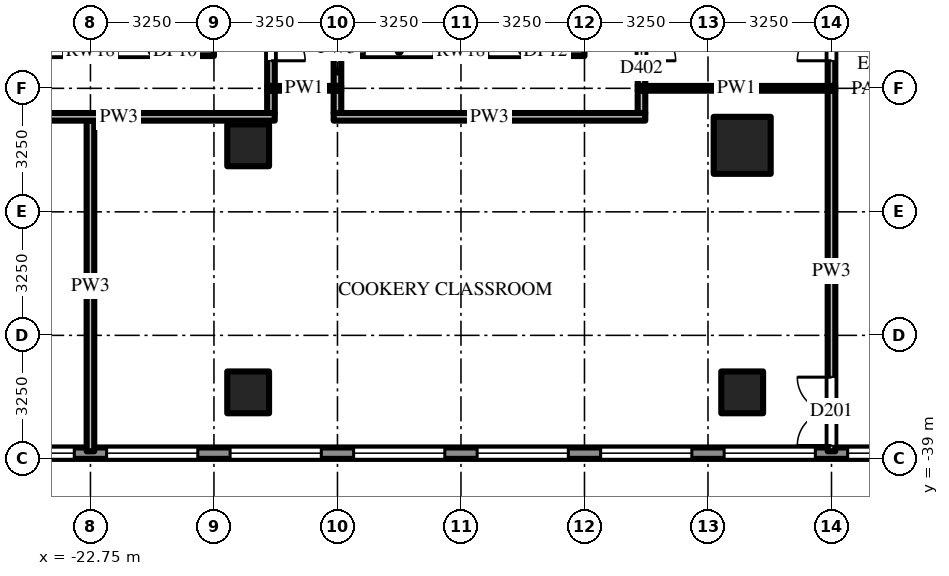
"""IFC4 building model, lengths in metres.
Left out: names, types, materials, properties, quantities, classifications, styles, units other than length and angle.
Written with IfcOpenShell. Run it as: python <this file> out.ifc"""

import sys

from ifc_helpers import new_model, si_unit, direction, frame, frame_2d, origin, origin_2d, place, context, subcontext, project, spatial, rectangle, extrude, source, transform, mapped, element, fill, save


model = new_model("IFC4")
c1 = context("Model", 3, precision=1e-05, world=origin(), true_north=direction((0.0, 1.0)))
c2 = subcontext(c1, "Body", "Model", "MODEL_VIEW")
j1 = project(units=[si_unit("LENGTHUNIT", "METRE"), si_unit("PLANEANGLEUNIT", "RADIAN")], contexts=[c1])
p1 = place(None, origin())
s1 = spatial("IfcSite", under=j1, at=p1, CompositionType="ELEMENT")
p2 = place(p1, origin())
s2 = spatial("IfcBuilding", under=s1, at=p2, CompositionType="ELEMENT")
p3 = place(p2, frame((0.0, 0.0, 19.0)))
s3 = spatial("IfcBuildingStorey", under=s2, at=p3, CompositionType="ELEMENT", Elevation=19.0)
m1 = source(origin(), c2, "Body", "SweptSolid", [
    extrude(rectangle(XDim=1.5, YDim=1.5, at=origin_2d()), origin(), (0.0, 0.0, 1.0), 5.0),
])
p4 = place(p3, frame((-5.6, -30.75, 0.0), z_axis=(0.0, 0.0, 1.0), x_axis=(1.0, 0.0, 0.0)))
e1 = element("IfcColumn", 1, at=p4, inside=s3, PredefinedType="COLUMN", context=c2, shape_type="MappedRepresentation", body=[
    mapped(m1, transform((0.0, 0.0, 0.0))),
])
m2 = source(origin(), c2, "Body", "SweptSolid", [
    extrude(rectangle(XDim=1.1, YDim=1.1, at=origin_2d()), origin(), (0.0, 0.0, 1.0), 5.0),
])
for number, where, z_axis, x_axis in (
    (2, (-5.6, -37.25, 0.0), (0.0, 0.0, 1.0), (1.0, 0.0, 0.0)),
    (3, (-18.6, -30.75, 0.0), (0.0, 0.0, 1.0), (1.0, 0.0, 0.0)),
    (4, (-18.6, -37.25, 0.0), (0.0, 0.0, 1.0), (1.0, 0.0, 0.0)),
):
    element("IfcColumn", number, at=place(p3, frame(where, z_axis=z_axis, x_axis=x_axis)), inside=s3, PredefinedType="COLUMN", context=c2, shape_type="MappedRepresentation", body=[
        mapped(m2, transform((0.0, 0.0, 0.0))),
    ])
m3 = source(origin(), c2, "Body", "SweptSolid", [
    extrude(rectangle(XDim=6.5, YDim=0.25, at=frame_2d((3.25, 0.0))), origin(), (0.0, 0.0, 1.0), 4.7),
])
p5 = place(p3, frame((-26.0, -28.275, 0.0), z_axis=(0.0, 0.0, 1.0), x_axis=(1.0, 0.0, 0.0)))
e5 = element("IfcWall", 5, at=p5, inside=s3, PredefinedType="SHEAR", context=c2, shape_type="MappedRepresentation", body=[
    mapped(m3, transform((0.0, 0.0, 0.0))),
])
m4 = source(origin(), c2, "Body", "SweptSolid", [
    extrude(rectangle(XDim=1.8, YDim=2.1, at=frame_2d((0.9, 1.05))), frame((0.0, 0.135, 0.0), z_axis=(0.0, -1.0, 0.0), x_axis=(1.0, 0.0, 0.0)), (0.0, 0.0, 1.0), 0.27),
])
p6 = place(p5, frame((0.725, 0.0, 0.0)))
e6 = element("IfcOpeningElement", 6, at=p6, cuts=e5, PredefinedType="OPENING", context=c2, shape_type="MappedRepresentation", body=[
    mapped(m4, transform((0.0, 0.0, 0.0))),
])
p7 = place(p5, frame((3.975, 0.0, 0.0)))
e7 = element("IfcOpeningElement", 7, at=p7, cuts=e5, PredefinedType="OPENING", context=c2, shape_type="MappedRepresentation", body=[
    mapped(m4, transform((0.0, 0.0, 0.0))),
])
p8 = place(p3, frame((-16.25, -28.275, 0.0), z_axis=(0.0, 0.0, 1.0), x_axis=(1.0, 0.0, 0.0)))
e8 = element("IfcWall", 8, at=p8, inside=s3, PredefinedType="SHEAR", context=c2, shape_type="MappedRepresentation", body=[
    mapped(m3, transform((0.0, 0.0, 0.0))),
])
p9 = place(p8, frame((0.725, 0.0, 0.0)))
e9 = element("IfcOpeningElement", 9, at=p9, cuts=e8, PredefinedType="OPENING", context=c2, shape_type="MappedRepresentation", body=[
    mapped(m4, transform((0.0, 0.0, 0.0))),
])
p10 = place(p8, frame((3.975, 0.0, 0.0)))
e10 = element("IfcOpeningElement", 10, at=p10, cuts=e8, PredefinedType="OPENING", context=c2, shape_type="MappedRepresentation", body=[
    mapped(m4, transform((0.0, 0.0, 0.0))),
])
m5 = source(origin(), c2, "Body", "SweptSolid", [
    extrude(rectangle(XDim=71.5, YDim=0.3, at=frame_2d((35.75, 0.0))), origin(), (0.0, 0.0, 1.0), 4.7),
])
p11 = place(p3, frame((-35.75, -38.85, 0.0), z_axis=(0.0, 0.0, 1.0), x_axis=(1.0, 0.0, 0.0)))
e11 = element("IfcWall", 11, at=p11, inside=s3, PredefinedType="SOLIDWALL", context=c2, shape_type="MappedRepresentation", body=[
    mapped(m5, transform((0.0, 0.0, 0.0))),
])
m6 = source(origin(), c2, "Body", "SweptSolid", [
    extrude(rectangle(XDim=2.4, YDim=3.0, at=frame_2d((1.2, 1.5))), frame((0.0, 0.16, 0.0), z_axis=(0.0, -1.0, 0.0), x_axis=(1.0, 0.0, 0.0)), (0.0, 0.0, 1.0), 0.32),
])
p12 = place(p11, frame((0.425, 0.0, 0.9)))
e12 = element("IfcOpeningElement", 12, at=p12, cuts=e11, PredefinedType="OPENING", context=c2, shape_type="MappedRepresentation", body=[
    mapped(m6, transform((0.0, 0.0, 0.0))),
])
p13 = place(p11, frame((3.675, 0.0, 0.9)))
e13 = element("IfcOpeningElement", 13, at=p13, cuts=e11, PredefinedType="OPENING", context=c2, shape_type="MappedRepresentation", body=[
    mapped(m6, transform((0.0, 0.0, 0.0))),
])
p14 = place(p11, frame((6.925, 0.0, 0.9)))
e14 = element("IfcOpeningElement", 14, at=p14, cuts=e11, PredefinedType="OPENING", context=c2, shape_type="MappedRepresentation", body=[
    mapped(m6, transform((0.0, 0.0, 0.0))),
])
p15 = place(p11, frame((10.175, 0.0, 0.9)))
e15 = element("IfcOpeningElement", 15, at=p15, cuts=e11, PredefinedType="OPENING", context=c2, shape_type="MappedRepresentation", body=[
    mapped(m6, transform((0.0, 0.0, 0.0))),
])
p16 = place(p11, frame((13.425, 0.0, 0.9)))
e16 = element("IfcOpeningElement", 16, at=p16, cuts=e11, PredefinedType="OPENING", context=c2, shape_type="MappedRepresentation", body=[
    mapped(m6, transform((0.0, 0.0, 0.0))),
])
p17 = place(p11, frame((16.675, 0.0, 0.9)))
e17 = element("IfcOpeningElement", 17, at=p17, cuts=e11, PredefinedType="OPENING", context=c2, shape_type="MappedRepresentation", body=[
    mapped(m6, transform((0.0, 0.0, 0.0))),
])
p18 = place(p11, frame((19.925, 0.0, 0.9)))
e18 = element("IfcOpeningElement", 18, at=p18, cuts=e11, PredefinedType="OPENING", context=c2, shape_type="MappedRepresentation", body=[
    mapped(m6, transform((0.0, 0.0, 0.0))),
])
p19 = place(p11, frame((23.175, 0.0, 0.9)))
e19 = element("IfcOpeningElement", 19, at=p19, cuts=e11, PredefinedType="OPENING", context=c2, shape_type="MappedRepresentation", body=[
    mapped(m6, transform((0.0, 0.0, 0.0))),
])
p20 = place(p11, frame((26.425, 0.0, 0.9)))
e20 = element("IfcOpeningElement", 20, at=p20, cuts=e11, PredefinedType="OPENING", context=c2, shape_type="MappedRepresentation", body=[
    mapped(m6, transform((0.0, 0.0, 0.0))),
])
p21 = place(p11, frame((29.675, 0.0, 0.9)))
e21 = element("IfcOpeningElement", 21, at=p21, cuts=e11, PredefinedType="OPENING", context=c2, shape_type="MappedRepresentation", body=[
    mapped(m6, transform((0.0, 0.0, 0.0))),
])
p22 = place(p11, frame((32.925, 0.0, 0.9)))
e22 = element("IfcOpeningElement", 22, at=p22, cuts=e11, PredefinedType="OPENING", context=c2, shape_type="MappedRepresentation", body=[
    mapped(m6, transform((0.0, 0.0, 0.0))),
])
p23 = place(p11, frame((36.175, 0.0, 0.9)))
e23 = element("IfcOpeningElement", 23, at=p23, cuts=e11, PredefinedType="OPENING", context=c2, shape_type="MappedRepresentation", body=[
    mapped(m6, transform((0.0, 0.0, 0.0))),
])
p24 = place(p11, frame((39.425, 0.0, 0.9)))
e24 = element("IfcOpeningElement", 24, at=p24, cuts=e11, PredefinedType="OPENING", context=c2, shape_type="MappedRepresentation", body=[
    mapped(m6, transform((0.0, 0.0, 0.0))),
])
p25 = place(p11, frame((42.675, 0.0, 0.9)))
e25 = element("IfcOpeningElement", 25, at=p25, cuts=e11, PredefinedType="OPENING", context=c2, shape_type="MappedRepresentation", body=[
    mapped(m6, transform((0.0, 0.0, 0.0))),
])
p26 = place(p11, frame((45.925, 0.0, 0.9)))
e26 = element("IfcOpeningElement", 26, at=p26, cuts=e11, PredefinedType="OPENING", context=c2, shape_type="MappedRepresentation", body=[
    mapped(m6, transform((0.0, 0.0, 0.0))),
])
p27 = place(p11, frame((49.175, 0.0, 0.9)))
e27 = element("IfcOpeningElement", 27, at=p27, cuts=e11, PredefinedType="OPENING", context=c2, shape_type="MappedRepresentation", body=[
    mapped(m6, transform((0.0, 0.0, 0.0))),
])
p28 = place(p11, frame((52.425, 0.0, 0.9)))
e28 = element("IfcOpeningElement", 28, at=p28, cuts=e11, PredefinedType="OPENING", context=c2, shape_type="MappedRepresentation", body=[
    mapped(m6, transform((0.0, 0.0, 0.0))),
])
p29 = place(p11, frame((55.675, 0.0, 0.9)))
e29 = element("IfcOpeningElement", 29, at=p29, cuts=e11, PredefinedType="OPENING", context=c2, shape_type="MappedRepresentation", body=[
    mapped(m6, transform((0.0, 0.0, 0.0))),
])
p30 = place(p11, frame((58.925, 0.0, 0.9)))
e30 = element("IfcOpeningElement", 30, at=p30, cuts=e11, PredefinedType="OPENING", context=c2, shape_type="MappedRepresentation", body=[
    mapped(m6, transform((0.0, 0.0, 0.0))),
])
p31 = place(p11, frame((62.175, 0.0, 0.9)))
e31 = element("IfcOpeningElement", 31, at=p31, cuts=e11, PredefinedType="OPENING", context=c2, shape_type="MappedRepresentation", body=[
    mapped(m6, transform((0.0, 0.0, 0.0))),
])
p32 = place(p11, frame((65.425, 0.0, 0.9)))
e32 = element("IfcOpeningElement", 32, at=p32, cuts=e11, PredefinedType="OPENING", context=c2, shape_type="MappedRepresentation", body=[
    mapped(m6, transform((0.0, 0.0, 0.0))),
])
p33 = place(p11, frame((68.675, 0.0, 0.9)))
e33 = element("IfcOpeningElement", 33, at=p33, cuts=e11, PredefinedType="OPENING", context=c2, shape_type="MappedRepresentation", body=[
    mapped(m6, transform((0.0, 0.0, 0.0))),
])
m7 = source(origin(), c2, "Body", "SweptSolid", [
    extrude(rectangle(XDim=8.7, YDim=0.2, at=frame_2d((4.35, 0.0))), origin(), (0.0, 0.0, 1.0), 3.762),
])
p34 = place(p3, frame((-22.75, -38.8, 0.0), z_axis=(0.0, 0.0, 1.0), x_axis=(0.0, 1.0, 0.0)))
e34 = element("IfcWall", 34, at=p34, inside=s3, PredefinedType="PARTITIONING", context=c2, shape_type="MappedRepresentation", body=[
    mapped(m7, transform((0.0, 0.0, 0.0))),
])
m8 = source(origin(), c2, "Body", "SweptSolid", [
    extrude(rectangle(XDim=3.087, YDim=0.2, at=frame_2d((1.544, 0.0))), origin(), (0.0, 0.0, 1.0), 4.274),
])
p35 = place(p3, frame((-18.0, -26.1, 0.0), z_axis=(0.0, 0.0, 1.0), x_axis=(0.0, -1.0, 0.0)))
e35 = element("IfcWall", 35, at=p35, inside=s3, PredefinedType="PARTITIONING", context=c2, shape_type="MappedRepresentation", body=[
    mapped(m8, transform((0.0, 0.0, 0.0))),
])
m9 = source(origin(), c2, "Body", "SweptSolid", [
    extrude(rectangle(XDim=1.8, YDim=2.1, at=frame_2d((0.9, 1.05))), frame((0.0, 0.11, 0.0), z_axis=(0.0, -1.0, 0.0), x_axis=(1.0, 0.0, 0.0)), (0.0, 0.0, 1.0), 0.22),
])
p36 = place(p35, frame((0.625, 0.0, 0.0)))
e36 = element("IfcOpeningElement", 36, at=p36, cuts=e35, PredefinedType="OPENING", context=c2, shape_type="MappedRepresentation", body=[
    mapped(m9, transform((0.0, 0.0, 0.0))),
])
m10 = source(origin(), c2, "Body", "SweptSolid", [
    extrude(rectangle(XDim=0.587, YDim=0.2, at=frame_2d((0.294, 0.0))), origin(), (0.0, 0.0, 1.0), 4.7),
])
p37 = place(p3, frame((-18.0, -29.312, 0.0), z_axis=(0.0, 0.0, 1.0), x_axis=(0.0, -1.0, 0.0)))
e37 = element("IfcWall", 37, at=p37, inside=s3, PredefinedType="PARTITIONING", context=c2, shape_type="MappedRepresentation", body=[
    mapped(m10, transform((0.0, 0.0, 0.0))),
])
m11 = source(origin(), c2, "Body", "SweptSolid", [
    extrude(rectangle(XDim=0.788, YDim=0.2, at=frame_2d((0.394, 0.0))), origin(), (0.0, 0.0, 1.0), 4.7),
])
p38 = place(p3, frame((-16.25, -29.188, 0.0), z_axis=(0.0, 0.0, 1.0), x_axis=(0.0, 1.0, 0.0)))
e38 = element("IfcWall", 38, at=p38, inside=s3, PredefinedType="PARTITIONING", context=c2, shape_type="MappedRepresentation", body=[
    mapped(m11, transform((0.0, 0.0, 0.0))),
])
p39 = place(p3, frame((-16.25, -29.312, 0.0), z_axis=(0.0, 0.0, 1.0), x_axis=(0.0, -1.0, 0.0)))
e39 = element("IfcWall", 39, at=p39, inside=s3, PredefinedType="PARTITIONING", context=c2, shape_type="MappedRepresentation", body=[
    mapped(m10, transform((0.0, 0.0, 0.0))),
])
p40 = place(p3, frame((-8.25, -26.1, 0.0), z_axis=(0.0, 0.0, 1.0), x_axis=(0.0, -1.0, 0.0)))
e40 = element("IfcWall", 40, at=p40, inside=s3, PredefinedType="PARTITIONING", context=c2, shape_type="MappedRepresentation", body=[
    mapped(m8, transform((0.0, 0.0, 0.0))),
])
p41 = place(p40, frame((0.625, 0.0, 0.0)))
e41 = element("IfcOpeningElement", 41, at=p41, cuts=e40, PredefinedType="OPENING", context=c2, shape_type="MappedRepresentation", body=[
    mapped(m9, transform((0.0, 0.0, 0.0))),
])
p42 = place(p3, frame((-8.25, -29.9, 0.0), z_axis=(0.0, 0.0, 1.0), x_axis=(0.0, 1.0, 0.0)))
e42 = element("IfcWall", 42, at=p42, inside=s3, PredefinedType="PARTITIONING", context=c2, shape_type="MappedRepresentation", body=[
    mapped(m10, transform((0.0, 0.0, 0.0))),
])
m12 = source(origin(), c2, "Body", "SweptSolid", [
    extrude(rectangle(XDim=3.188, YDim=0.2, at=frame_2d((1.594, 0.0))), origin(), (0.0, 0.0, 1.0), 4.7),
])
p43 = place(p3, frame((-3.25, -29.188, 0.0), z_axis=(0.0, 0.0, 1.0), x_axis=(0.0, 1.0, 0.0)))
e43 = element("IfcWall", 43, at=p43, inside=s3, PredefinedType="PARTITIONING", context=c2, shape_type="MappedRepresentation", body=[
    mapped(m12, transform((0.0, 0.0, 0.0))),
])
p44 = place(p43, frame((0.663, 0.0, 0.0)))
e44 = element("IfcOpeningElement", 44, at=p44, cuts=e43, PredefinedType="OPENING", context=c2, shape_type="MappedRepresentation", body=[
    mapped(m9, transform((0.0, 0.0, 0.0))),
])
m13 = source(origin(), c2, "Body", "SweptSolid", [
    extrude(rectangle(XDim=9.488, YDim=0.2, at=frame_2d((4.744, 0.0))), origin(), (0.0, 0.0, 1.0), 3.918),
])
p45 = place(p3, frame((-3.25, -38.8, 0.0), z_axis=(0.0, 0.0, 1.0), x_axis=(0.0, 1.0, 0.0)))
e45 = element("IfcWall", 45, at=p45, inside=s3, PredefinedType="PARTITIONING", context=c2, shape_type="MappedRepresentation", body=[
    mapped(m13, transform((0.0, 0.0, 0.0))),
])
p46 = place(p45, frame((0.15, 0.0, 0.0)))
e46 = element("IfcOpeningElement", 46, at=p46, cuts=e45, PredefinedType="OPENING", context=c2, shape_type="MappedRepresentation", body=[
    mapped(m9, transform((0.0, 0.0, 0.0))),
])
m14 = source(origin(), c2, "Body", "SweptSolid", [
    extrude(rectangle(XDim=8.2, YDim=0.2, at=frame_2d((4.1, 0.0))), origin(), (0.0, 0.0, 1.0), 3.762),
])
p47 = place(p3, frame((-17.9, -30.0, 0.0), z_axis=(0.0, 0.0, 1.0), x_axis=(-1.0, 0.0, 0.0)))
e47 = element("IfcWall", 47, at=p47, inside=s3, PredefinedType="PARTITIONING", context=c2, shape_type="MappedRepresentation", body=[
    mapped(m14, transform((0.0, 0.0, 0.0))),
])
m15 = source(origin(), c2, "Body", "SweptSolid", [
    extrude(rectangle(XDim=8.2, YDim=0.2, at=frame_2d((4.1, 0.0))), origin(), (0.0, 0.0, 1.0), 4.7),
])
p48 = place(p3, frame((-8.15, -30.0, 0.0), z_axis=(0.0, 0.0, 1.0), x_axis=(-1.0, 0.0, 0.0)))
e48 = element("IfcWall", 48, at=p48, inside=s3, PredefinedType="PARTITIONING", context=c2, shape_type="MappedRepresentation", body=[
    mapped(m15, transform((0.0, 0.0, 0.0))),
])
m16 = source(origin(), c2, "Body", "SweptSolid", [
    extrude(rectangle(XDim=1.95, YDim=0.125, at=frame_2d((0.975, 0.0))), origin(), (0.0, 0.0, 1.0), 4.7),
])
p49 = place(p3, frame((-16.15, -29.25, 0.0), z_axis=(0.0, 0.0, 1.0), x_axis=(-1.0, 0.0, 0.0)))
e49 = element("IfcWall", 49, at=p49, inside=s3, PredefinedType="PARTITIONING", context=c2, shape_type="MappedRepresentation", body=[
    mapped(m16, transform((0.0, 0.0, 0.0))),
])
m17 = source(origin(), c2, "Body", "SweptSolid", [
    extrude(rectangle(XDim=5.2, YDim=0.125, at=frame_2d((2.6, 0.0))), origin(), (0.0, 0.0, 1.0), 3.762),
])
p50 = place(p3, frame((-3.15, -29.25, 0.0), z_axis=(0.0, 0.0, 1.0), x_axis=(-1.0, 0.0, 0.0)))
e50 = element("IfcWall", 50, at=p50, inside=s3, PredefinedType="PARTITIONING", context=c2, shape_type="MappedRepresentation", body=[
    mapped(m17, transform((0.0, 0.0, 0.0))),
])
m18 = source(origin(), c2, "Body", "SweptSolid", [
    extrude(rectangle(XDim=2.4, YDim=3.0, at=frame_2d((1.2, 1.5))), frame((0.0, 0.03, 0.0), z_axis=(0.0, -1.0, 0.0), x_axis=(1.0, 0.0, 0.0)), (0.0, 0.0, 1.0), 0.06),
])
p51 = place(p15, origin())
e51 = element("IfcWindow", 51, at=p51, inside=s3, PartitioningType="SINGLE_PANEL", PredefinedType="WINDOW", context=c2, shape_type="MappedRepresentation", body=[
    mapped(m18, transform((0.0, 0.0, 0.0))),
])
fill(e15, e51)
p52 = place(p16, origin())
e52 = element("IfcWindow", 52, at=p52, inside=s3, PartitioningType="SINGLE_PANEL", PredefinedType="WINDOW", context=c2, shape_type="MappedRepresentation", body=[
    mapped(m18, transform((0.0, 0.0, 0.0))),
])
fill(e16, e52)
p53 = place(p17, origin())
e53 = element("IfcWindow", 53, at=p53, inside=s3, PartitioningType="SINGLE_PANEL", PredefinedType="WINDOW", context=c2, shape_type="MappedRepresentation", body=[
    mapped(m18, transform((0.0, 0.0, 0.0))),
])
fill(e17, e53)
p54 = place(p18, origin())
e54 = element("IfcWindow", 54, at=p54, inside=s3, PartitioningType="SINGLE_PANEL", PredefinedType="WINDOW", context=c2, shape_type="MappedRepresentation", body=[
    mapped(m18, transform((0.0, 0.0, 0.0))),
])
fill(e18, e54)
p55 = place(p19, origin())
e55 = element("IfcWindow", 55, at=p55, inside=s3, PartitioningType="SINGLE_PANEL", PredefinedType="WINDOW", context=c2, shape_type="MappedRepresentation", body=[
    mapped(m18, transform((0.0, 0.0, 0.0))),
])
fill(e19, e55)
p56 = place(p20, origin())
e56 = element("IfcWindow", 56, at=p56, inside=s3, PartitioningType="SINGLE_PANEL", PredefinedType="WINDOW", context=c2, shape_type="MappedRepresentation", body=[
    mapped(m18, transform((0.0, 0.0, 0.0))),
])
fill(e20, e56)
p57 = place(p21, origin())
e57 = element("IfcWindow", 57, at=p57, inside=s3, PartitioningType="SINGLE_PANEL", PredefinedType="WINDOW", context=c2, shape_type="MappedRepresentation", body=[
    mapped(m18, transform((0.0, 0.0, 0.0))),
])
fill(e21, e57)
p58 = place(p22, origin())
e58 = element("IfcWindow", 58, at=p58, inside=s3, PartitioningType="SINGLE_PANEL", PredefinedType="WINDOW", context=c2, shape_type="MappedRepresentation", body=[
    mapped(m18, transform((0.0, 0.0, 0.0))),
])
fill(e22, e58)
m19 = source(origin(), c2, "Body", "SweptSolid", [
    extrude(rectangle(XDim=1.8, YDim=2.1, at=frame_2d((0.9, 1.05))), frame((0.0, 0.025, 0.0), z_axis=(0.0, -1.0, 0.0), x_axis=(1.0, 0.0, 0.0)), (0.0, 0.0, 1.0), 0.05),
])
p59 = place(p46, origin())
e59 = element("IfcDoor", 59, at=p59, inside=s3, OperationType="DOUBLE_DOOR_SINGLE_SWING", PredefinedType="DOOR", context=c2, shape_type="MappedRepresentation", body=[
    mapped(m19, transform((0.0, 0.0, 0.0))),
])
fill(e46, e59)
p60 = place(p36, origin())
e60 = element("IfcDoor", 60, at=p60, inside=s3, OperationType="DOUBLE_DOOR_SINGLE_SWING", PredefinedType="DOOR", context=c2, shape_type="MappedRepresentation", body=[
    mapped(m19, transform((0.0, 0.0, 0.0))),
])
fill(e36, e60)
p61 = place(p41, origin())
e61 = element("IfcDoor", 61, at=p61, inside=s3, OperationType="DOUBLE_DOOR_SINGLE_SWING", PredefinedType="DOOR", context=c2, shape_type="MappedRepresentation", body=[
    mapped(m19, transform((0.0, 0.0, 0.0))),
])
fill(e41, e61)
p62 = place(p44, origin())
e62 = element("IfcDoor", 62, at=p62, inside=s3, OperationType="DOUBLE_DOOR_SINGLE_SWING", PredefinedType="DOOR", context=c2, shape_type="MappedRepresentation", body=[
    mapped(m19, transform((0.0, 0.0, 0.0))),
])
fill(e44, e62)
save(model, sys.argv[1])
